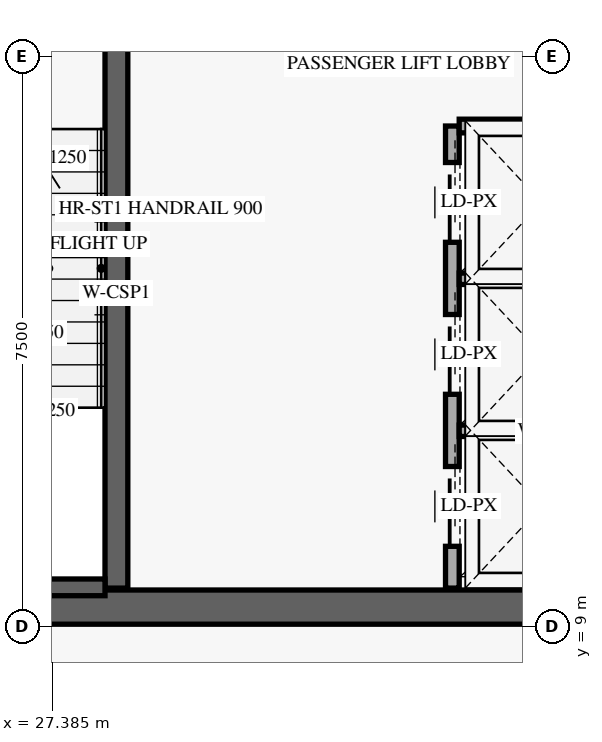
"""IFC4 building model, lengths in metres.
Left out: names, types, materials, properties, quantities, classifications, styles, units other than length and angle.
Written with IfcOpenShell. Run it as: python <this file> out.ifc"""

import sys

from ifc_helpers import new_model, si_unit, direction, frame, frame_2d, origin, place, context, subcontext, project, spatial, rectangle, extrude, element, fill, save


model = new_model("IFC4")
c1 = context("Model", 3, precision=1e-05, world=origin(), true_north=direction((0.0, 1.0)))
c2 = subcontext(c1, "Body", "Model", "MODEL_VIEW")
j1 = project(units=[si_unit("LENGTHUNIT", "METRE"), si_unit("PLANEANGLEUNIT", "RADIAN")], contexts=[c1])
p1 = place(None, origin())
s1 = spatial("IfcSite", under=j1, at=p1, CompositionType="ELEMENT")
p2 = place(p1, origin())
s2 = spatial("IfcBuilding", under=s1, at=p2, CompositionType="ELEMENT")
p3 = place(p2, frame((0.0, 0.0, 4.8)))
s3 = spatial("IfcBuildingStorey", under=s2, at=p3, CompositionType="ELEMENT", Elevation=4.8)
p4 = place(p3, frame((24.7, 9.25, 0.0), z_axis=(0.0, 0.0, 1.0), x_axis=(1.0, 0.0, 0.0)))
e1 = element("IfcWall", 1, at=p4, inside=s3, PredefinedType="SHEAR", context=c2, shape_type="SweptSolid", body=[
    extrude(rectangle(XDim=10.0, YDim=0.45, at=frame_2d((5.0, 0.0))), origin(), (0.0, 0.0, 1.0), 4.52),
])
p5 = place(p3, frame((28.23, 9.5, 0.0), z_axis=(0.0, 0.0, 1.0), x_axis=(0.0, 1.0, 0.0)))
e2 = element("IfcWall", 2, at=p5, inside=s3, PredefinedType="SHEAR", context=c2, shape_type="SweptSolid", body=[
    extrude(rectangle(XDim=7.76, YDim=0.3, at=frame_2d((3.88, 0.0))), origin(), (0.0, 0.0, 1.0), 4.52),
])
p6 = place(p3, frame((24.92, 9.51, 0.0), z_axis=(0.0, 0.0, 1.0), x_axis=(1.0, 0.0, 0.0)))
e3 = element("IfcWall", 3, at=p6, inside=s3, PredefinedType="SHEAR", context=c2, shape_type="SweptSolid", body=[
    extrude(rectangle(XDim=3.16, YDim=0.22, at=frame_2d((1.58, 0.0))), origin(), (0.0, 0.0, 1.0), 4.52),
])
p7 = place(p3, frame((32.65, 9.5, 0.0), z_axis=(0.0, 0.0, 1.0), x_axis=(0.0, 1.0, 0.0)))
e4 = element("IfcWall", 4, at=p7, inside=s3, PredefinedType="STANDARD", context=c2, shape_type="SweptSolid", body=[
    extrude(rectangle(XDim=6.08, YDim=0.18, at=frame_2d((3.04, 0.0))), origin(), (0.0, 0.0, 1.0), 4.52),
])
p8 = place(p7, frame((0.55, 0.0, 0.0)))
e5 = element("IfcOpeningElement", 5, at=p8, cuts=e4, PredefinedType="OPENING", context=c2, shape_type="SweptSolid", body=[
    extrude(rectangle(XDim=1.05, YDim=2.2, at=frame_2d((0.525, 1.1))), frame((0.0, 0.1, 0.0), z_axis=(0.0, -1.0, 0.0), x_axis=(1.0, 0.0, 0.0)), (0.0, 0.0, 1.0), 0.2),
])
p9 = place(p7, frame((2.55, 0.0, 0.0)))
e6 = element("IfcOpeningElement", 6, at=p9, cuts=e4, PredefinedType="OPENING", context=c2, shape_type="SweptSolid", body=[
    extrude(rectangle(XDim=1.05, YDim=2.2, at=frame_2d((0.525, 1.1))), frame((0.0, 0.1, 0.0), z_axis=(0.0, -1.0, 0.0), x_axis=(1.0, 0.0, 0.0)), (0.0, 0.0, 1.0), 0.2),
])
p10 = place(p7, frame((4.55, 0.0, 0.0)))
e7 = element("IfcOpeningElement", 7, at=p10, cuts=e4, PredefinedType="OPENING", context=c2, shape_type="SweptSolid", body=[
    extrude(rectangle(XDim=1.05, YDim=2.2, at=frame_2d((0.525, 1.1))), frame((0.0, 0.1, 0.0), z_axis=(0.0, -1.0, 0.0), x_axis=(1.0, 0.0, 0.0)), (0.0, 0.0, 1.0), 0.2),
])
p11 = place(p3, frame((32.74, 15.58, 0.0), z_axis=(0.0, 0.0, 1.0), x_axis=(1.0, 0.0, 0.0)))
e8 = element("IfcWall", 8, at=p11, inside=s3, PredefinedType="STANDARD", context=c2, shape_type="SweptSolid", body=[
    extrude(rectangle(XDim=2.21, YDim=0.18, at=frame_2d((1.105, 0.0))), origin(), (0.0, 0.0, 1.0), 4.52),
])
for number, where, z_axis, x_axis in (
    (9, (32.74, 11.57, 0.0), (0.0, 0.0, 1.0), (1.0, 0.0, 0.0)),
    (10, (32.74, 13.57, 0.0), (0.0, 0.0, 1.0), (1.0, 0.0, 0.0)),
):
    element("IfcWall", number, at=place(p3, frame(where, z_axis=z_axis, x_axis=x_axis)), inside=s3, PredefinedType="STANDARD", context=c2, shape_type="SweptSolid", body=[
        extrude(rectangle(XDim=2.21, YDim=0.15, at=frame_2d((1.105, 0.0))), origin(), (0.0, 0.0, 1.0), 4.52),
    ])
p12 = place(p8, origin())
e11 = element("IfcDoor", 11, at=p12, inside=s3, OperationType="SLIDING_TO_LEFT", PredefinedType="DOOR", context=c2, shape_type="SweptSolid", body=[
    extrude(rectangle(XDim=1.05, YDim=2.2, at=frame_2d((0.525, 1.1))), frame((0.0, 0.025, 0.0), z_axis=(0.0, -1.0, 0.0), x_axis=(1.0, 0.0, 0.0)), (0.0, 0.0, 1.0), 0.05),
])
fill(e5, e11)
p13 = place(p9, origin())
e12 = element("IfcDoor", 12, at=p13, inside=s3, OperationType="SLIDING_TO_LEFT", PredefinedType="DOOR", context=c2, shape_type="SweptSolid", body=[
    extrude(rectangle(XDim=1.05, YDim=2.2, at=frame_2d((0.525, 1.1))), frame((0.0, 0.025, 0.0), z_axis=(0.0, -1.0, 0.0), x_axis=(1.0, 0.0, 0.0)), (0.0, 0.0, 1.0), 0.05),
])
fill(e6, e12)
p14 = place(p10, origin())
e13 = element("IfcDoor", 13, at=p14, inside=s3, OperationType="SLIDING_TO_LEFT", PredefinedType="DOOR", context=c2, shape_type="SweptSolid", body=[
    extrude(rectangle(XDim=1.05, YDim=2.2, at=frame_2d((0.525, 1.1))), frame((0.0, 0.025, 0.0), z_axis=(0.0, -1.0, 0.0), x_axis=(1.0, 0.0, 0.0)), (0.0, 0.0, 1.0), 0.05),
])
fill(e7, e13)
save(model, sys.argv[1])
